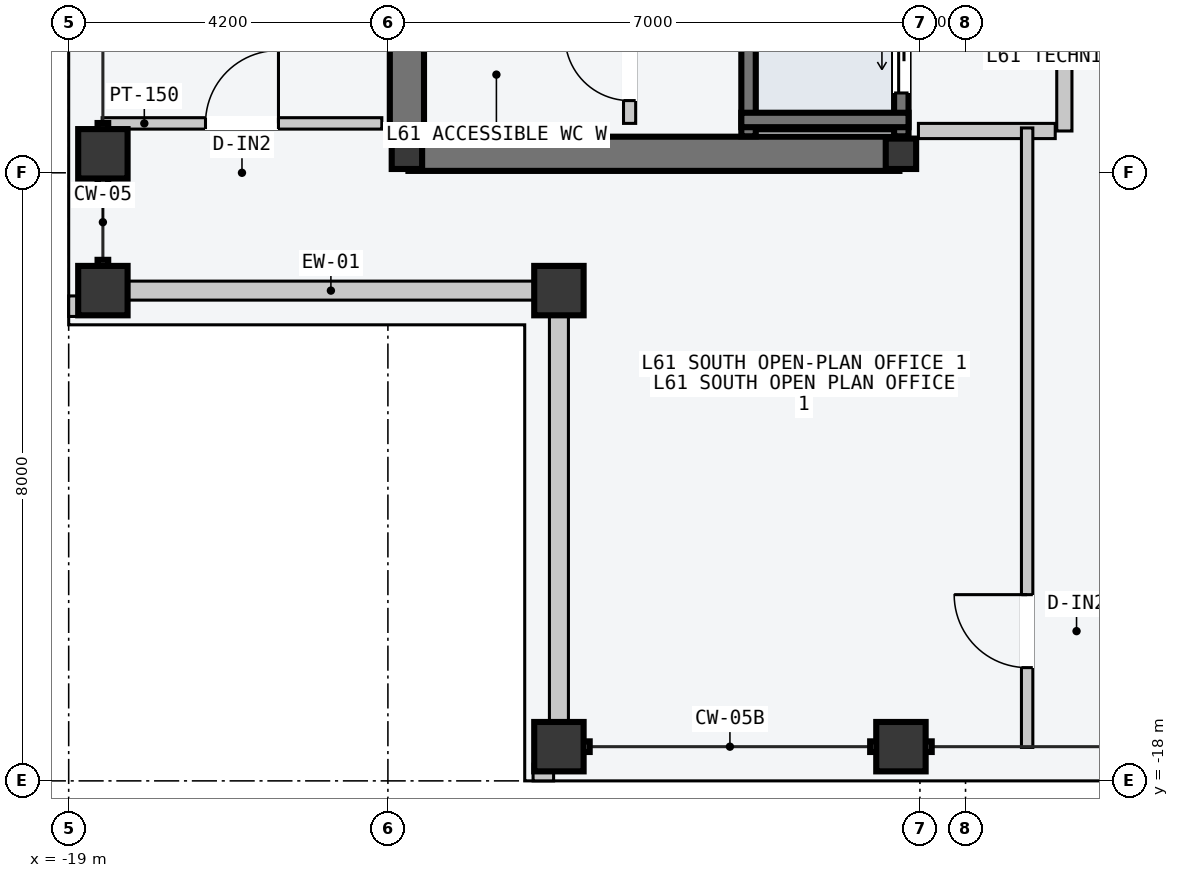
"""IFC4 building model, lengths in metres.
Left out: names, types, materials, properties, quantities, classifications, styles, units other than length and angle.
Written with IfcOpenShell. Run it as: python <this file> out.ifc"""

import sys

from ifc_helpers import new_model, si_unit, direction, frame, frame_2d, origin, origin_2d, place, context, subcontext, project, spatial, rectangle, hollow_rectangle, i_section, extrude, element, fill, save


model = new_model("IFC4")
c1 = context("Model", 3, precision=1e-05, world=origin(), true_north=direction((0.0, 1.0)))
c2 = subcontext(c1, "Body", "Model", "MODEL_VIEW")
j1 = project(units=[si_unit("LENGTHUNIT", "METRE"), si_unit("PLANEANGLEUNIT", "RADIAN")], contexts=[c1])
p1 = place(None, origin())
s1 = spatial("IfcSite", under=j1, at=p1, CompositionType="ELEMENT")
p2 = place(p1, origin())
s2 = spatial("IfcBuilding", under=s1, at=p2, CompositionType="ELEMENT")
p3 = place(p2, frame((0.0, 0.0, 232.8)))
s3 = spatial("IfcBuildingStorey", under=s2, at=p3, CompositionType="ELEMENT", Elevation=232.8)
p4 = place(p3, frame((-14.53, -9.75, -0.2), z_axis=(0.0, 0.0, 1.0), x_axis=(1.0, 0.0, 0.0)))
e1 = element("IfcWall", 1, at=p4, inside=s3, PredefinedType="SHEAR", context=c2, shape_type="SweptSolid", body=[
    extrude(rectangle(XDim=6.46, YDim=0.45, at=frame_2d((3.23, 0.0))), origin(), (0.0, 0.0, 1.0), 3.6),
])
p5 = place(p3, frame((-14.55, -9.55, -0.2), z_axis=(0.0, 0.0, 1.0), x_axis=(0.0, 1.0, 0.0)))
e2 = element("IfcWall", 2, at=p5, inside=s3, PredefinedType="SHEAR", context=c2, shape_type="SweptSolid", body=[
    extrude(rectangle(XDim=9.35, YDim=0.45, at=frame_2d((4.675, 0.0))), origin(), (0.0, 0.0, 1.0), 3.6),
])
for number, where, z_axis, x_axis in (
    (3, (-14.55, -9.75, 0.0), (0.0, 0.0, 1.0), (1.0, 0.0, 0.0)),
    (4, (-8.05, -9.75, 0.0), (0.0, 0.0, 1.0), (1.0, 0.0, 0.0)),
):
    element("IfcColumn", number, at=place(p3, frame(where, z_axis=z_axis, x_axis=x_axis)), inside=s3, PredefinedType="COLUMN", context=c2, shape_type="SweptSolid", body=[
        extrude(i_section(OverallWidth=0.4, OverallDepth=0.4, WebThickness=0.013, FlangeThickness=0.021, at=origin_2d()), origin(), (0.0, 0.0, 1.0), 3.6),
    ])
for number, where, z_axis, x_axis in (
    (5, (-12.55, -17.55, 0.0), (0.0, 0.0, 1.0), (1.0, 0.0, 0.0)),
    (6, (-8.05, -17.55, 0.0), (0.0, 0.0, 1.0), (1.0, 0.0, 0.0)),
    (7, (-18.55, -11.55, 0.0), (0.0, 0.0, 1.0), (0.0, 1.0, 0.0)),
    (8, (-18.55, -9.75, 0.0), (0.0, 0.0, 1.0), (0.0, 1.0, 0.0)),
    (9, (-12.55, -11.55, 0.0), (0.0, 0.0, 1.0), (1.0, 0.0, 0.0)),
):
    element("IfcColumn", number, at=place(p3, frame(where, z_axis=z_axis, x_axis=x_axis)), inside=s3, PredefinedType="COLUMN", context=c2, shape_type="SweptSolid", body=[
        extrude(hollow_rectangle(XDim=0.65, YDim=0.65, WallThickness=0.028, at=origin_2d()), origin(), (0.0, 0.0, 1.0), 3.6),
    ])
for number, where, z_axis, x_axis in (
    (10, (-18.215, -11.55, 0.0), (0.0, 0.0, 1.0), (1.0, 0.0, 0.0)),
    (11, (-12.55, -17.215, 0.0), (0.0, 0.0, 1.0), (0.0, 1.0, 0.0)),
):
    element("IfcWall", number, at=place(p3, frame(where, z_axis=z_axis, x_axis=x_axis)), inside=s3, PredefinedType="STANDARD", context=c2, shape_type="SweptSolid", body=[
        extrude(rectangle(XDim=5.33, YDim=0.25, at=frame_2d((2.665, 0.0))), origin(), (0.0, 0.0, 1.0), 2.85),
    ])
for number, where, z_axis, x_axis in (
    (12, (-12.89, -17.89, 0.0), (0.0, 0.0, 1.0), (1.0, 0.0, 0.0)),
    (13, (-18.89, -11.89, 0.0), (0.0, 0.0, 1.0), (0.0, 1.0, 0.0)),
):
    element("IfcWall", number, at=place(p3, frame(where, z_axis=z_axis, x_axis=x_axis)), inside=s3, PredefinedType="PARAPET", context=c2, shape_type="SweptSolid", body=[
        extrude(rectangle(XDim=0.27, YDim=0.22, at=frame_2d((0.135, 0.0))), origin(), (0.0, 0.0, 1.0), 1.2),
    ])
p6 = place(p3, frame((-8.045, -9.52, -0.2), z_axis=(0.0, 0.0, 1.0), x_axis=(0.0, 1.0, 0.0)))
e14 = element("IfcWall", 14, at=p6, inside=s3, PredefinedType="SOLIDWALL", context=c2, shape_type="SweptSolid", body=[
    extrude(rectangle(XDim=2.12, YDim=0.19, at=frame_2d((1.06, 0.0))), origin(), (0.0, 0.0, 1.0), 3.6),
])
p7 = place(p6, frame((0.57, 0.0, 0.2)))
e15 = element("IfcOpeningElement", 15, at=p7, cuts=e14, PredefinedType="OPENING", context=c2, shape_type="SweptSolid", body=[
    extrude(rectangle(XDim=1.1, YDim=2.2, at=frame_2d((0.55, 1.1))), frame((0.0, 0.105, 0.0), z_axis=(0.0, -1.0, 0.0), x_axis=(1.0, 0.0, 0.0)), (0.0, 0.0, 1.0), 0.21),
])
p8 = place(p3, frame((-10.055, -9.52, -0.2), z_axis=(0.0, 0.0, 1.0), x_axis=(0.0, 1.0, 0.0)))
e16 = element("IfcWall", 16, at=p8, inside=s3, PredefinedType="SOLIDWALL", context=c2, shape_type="SweptSolid", body=[
    extrude(rectangle(XDim=2.12, YDim=0.19, at=frame_2d((1.06, 0.0))), origin(), (0.0, 0.0, 1.0), 3.6),
])
p9 = place(p3, frame((-10.15, -9.305, -0.2), z_axis=(0.0, 0.0, 1.0), x_axis=(1.0, 0.0, 0.0)))
e17 = element("IfcWall", 17, at=p9, inside=s3, PredefinedType="SOLIDWALL", context=c2, shape_type="SweptSolid", body=[
    extrude(rectangle(XDim=2.2, YDim=0.19, at=frame_2d((1.1, 0.0))), origin(), (0.0, 0.0, 1.0), 3.6),
])
p10 = place(p3, frame((-5.9, -9.45, 0.0), z_axis=(0.0, 0.0, 1.0), x_axis=(0.0, 1.0, 0.0)))
e18 = element("IfcWall", 18, at=p10, inside=s3, PredefinedType="PARTITIONING", context=c2, shape_type="SweptSolid", body=[
    extrude(rectangle(XDim=10.5, YDim=0.2, at=frame_2d((5.25, 0.0))), origin(), (0.0, 0.0, 1.0), 3.4),
])
p11 = place(p10, frame((3.9, 0.0, 0.0)))
e19 = element("IfcOpeningElement", 19, at=p11, cuts=e18, PredefinedType="OPENING", context=c2, shape_type="SweptSolid", body=[
    extrude(rectangle(XDim=1.5, YDim=2.2, at=frame_2d((0.75, 1.1))), frame((0.0, 0.11, 0.0), z_axis=(0.0, -1.0, 0.0), x_axis=(1.0, 0.0, 0.0)), (0.0, 0.0, 1.0), 0.22),
])
p12 = place(p3, frame((-6.02, -9.45, 0.0), z_axis=(0.0, 0.0, 1.0), x_axis=(-1.0, 0.0, 0.0)))
e20 = element("IfcWall", 20, at=p12, inside=s3, PredefinedType="PARTITIONING", context=c2, shape_type="SweptSolid", body=[
    extrude(rectangle(XDim=1.8, YDim=0.2, at=frame_2d((0.9, 0.0))), origin(), (0.0, 0.0, 1.0), 3.4),
])
p13 = place(p3, frame((-11.62, -9.35, 0.0), z_axis=(0.0, 0.0, 1.0), x_axis=(0.0, 1.0, 0.0)))
e21 = element("IfcWall", 21, at=p13, inside=s3, PredefinedType="PARTITIONING", context=c2, shape_type="SweptSolid", body=[
    extrude(rectangle(XDim=3.85, YDim=0.16, at=frame_2d((1.925, 0.0))), origin(), (0.0, 0.0, 1.0), 3.4),
])
p14 = place(p13, frame((0.3, 0.0, 0.0)))
e22 = element("IfcOpeningElement", 22, at=p14, cuts=e21, PredefinedType="OPENING", context=c2, shape_type="SweptSolid", body=[
    extrude(rectangle(XDim=0.85, YDim=2.12, at=frame_2d((0.425, 1.06))), frame((0.0, 0.09, 0.0), z_axis=(0.0, -1.0, 0.0), x_axis=(1.0, 0.0, 0.0)), (0.0, 0.0, 1.0), 0.18),
])
p15 = place(p13, frame((1.5, 0.0, 0.0)))
e23 = element("IfcOpeningElement", 23, at=p15, cuts=e21, PredefinedType="OPENING", context=c2, shape_type="SweptSolid", body=[
    extrude(rectangle(XDim=0.85, YDim=2.12, at=frame_2d((0.425, 1.06))), frame((0.0, 0.09, 0.0), z_axis=(0.0, -1.0, 0.0), x_axis=(1.0, 0.0, 0.0)), (0.0, 0.0, 1.0), 0.18),
])
p16 = place(p13, frame((2.7, 0.0, 0.0)))
e24 = element("IfcOpeningElement", 24, at=p16, cuts=e21, PredefinedType="OPENING", context=c2, shape_type="SweptSolid", body=[
    extrude(rectangle(XDim=0.85, YDim=2.12, at=frame_2d((0.425, 1.06))), frame((0.0, 0.09, 0.0), z_axis=(0.0, -1.0, 0.0), x_axis=(1.0, 0.0, 0.0)), (0.0, 0.0, 1.0), 0.18),
])
p17 = place(p3, frame((-6.39, -17.56, 0.0), z_axis=(0.0, 0.0, 1.0), x_axis=(0.0, 1.0, 0.0)))
e25 = element("IfcWall", 25, at=p17, inside=s3, PredefinedType="PARTITIONING", context=c2, shape_type="SweptSolid", body=[
    extrude(rectangle(XDim=8.15, YDim=0.15, at=frame_2d((4.075, 0.0))), origin(), (0.0, 0.0, 1.0), 3.4),
])
p18 = place(p17, frame((1.05, 0.0, 0.0)))
e26 = element("IfcOpeningElement", 26, at=p18, cuts=e25, PredefinedType="OPENING", context=c2, shape_type="SweptSolid", body=[
    extrude(rectangle(XDim=0.96, YDim=2.18, at=frame_2d((0.48, 1.09))), frame((0.0, 0.085, 0.0), z_axis=(0.0, -1.0, 0.0), x_axis=(1.0, 0.0, 0.0)), (0.0, 0.0, 1.0), 0.17),
])
p19 = place(p3, frame((-18.56, -9.35, 0.0), z_axis=(0.0, 0.0, 1.0), x_axis=(1.0, 0.0, 0.0)))
e27 = element("IfcWall", 27, at=p19, inside=s3, PredefinedType="PARTITIONING", context=c2, shape_type="SweptSolid", body=[
    extrude(rectangle(XDim=3.68, YDim=0.15, at=frame_2d((1.84, 0.0))), origin(), (0.0, 0.0, 1.0), 3.4),
])
p20 = place(p19, frame((1.36, 0.0, 0.0)))
e28 = element("IfcOpeningElement", 28, at=p20, cuts=e27, PredefinedType="OPENING", context=c2, shape_type="SweptSolid", body=[
    extrude(rectangle(XDim=0.96, YDim=2.18, at=frame_2d((0.48, 1.09))), frame((0.0, 0.085, 0.0), z_axis=(0.0, -1.0, 0.0), x_axis=(1.0, 0.0, 0.0)), (0.0, 0.0, 1.0), 0.17),
])
p21 = place(p7, origin())
e29 = element("IfcDoor", 29, at=p21, inside=s3, OperationType="SLIDING_TO_LEFT", PredefinedType="DOOR", context=c2, shape_type="SweptSolid", body=[
    extrude(rectangle(XDim=1.1, YDim=2.2, at=frame_2d((0.55, 1.1))), frame((0.0, 0.025, 0.0), z_axis=(0.0, -1.0, 0.0), x_axis=(1.0, 0.0, 0.0)), (0.0, 0.0, 1.0), 0.05),
])
fill(e15, e29)
p22 = place(p14, origin())
e30 = element("IfcDoor", 30, at=p22, inside=s3, OperationType="SINGLE_SWING_RIGHT", PredefinedType="DOOR", context=c2, shape_type="SweptSolid", body=[
    extrude(rectangle(XDim=0.85, YDim=2.12, at=frame_2d((0.425, 1.06))), frame((0.0, 0.025, 0.0), z_axis=(0.0, -1.0, 0.0), x_axis=(1.0, 0.0, 0.0)), (0.0, 0.0, 1.0), 0.05),
])
fill(e22, e30)
p23 = place(p18, origin())
e31 = element("IfcDoor", 31, at=p23, inside=s3, OperationType="SINGLE_SWING_RIGHT", PredefinedType="DOOR", context=c2, shape_type="SweptSolid", body=[
    extrude(rectangle(XDim=0.96, YDim=2.18, at=frame_2d((0.48, 1.09))), frame((0.0, 0.025, 0.0), z_axis=(0.0, -1.0, 0.0), x_axis=(1.0, 0.0, 0.0)), (0.0, 0.0, 1.0), 0.05),
])
fill(e26, e31)
p24 = place(p20, origin())
e32 = element("IfcDoor", 32, at=p24, inside=s3, OperationType="SINGLE_SWING_RIGHT", PredefinedType="DOOR", context=c2, shape_type="SweptSolid", body=[
    extrude(rectangle(XDim=0.96, YDim=2.18, at=frame_2d((0.48, 1.09))), frame((0.0, 0.025, 0.0), z_axis=(0.0, -1.0, 0.0), x_axis=(1.0, 0.0, 0.0)), (0.0, 0.0, 1.0), 0.05),
])
fill(e28, e32)
save(model, sys.argv[1])
